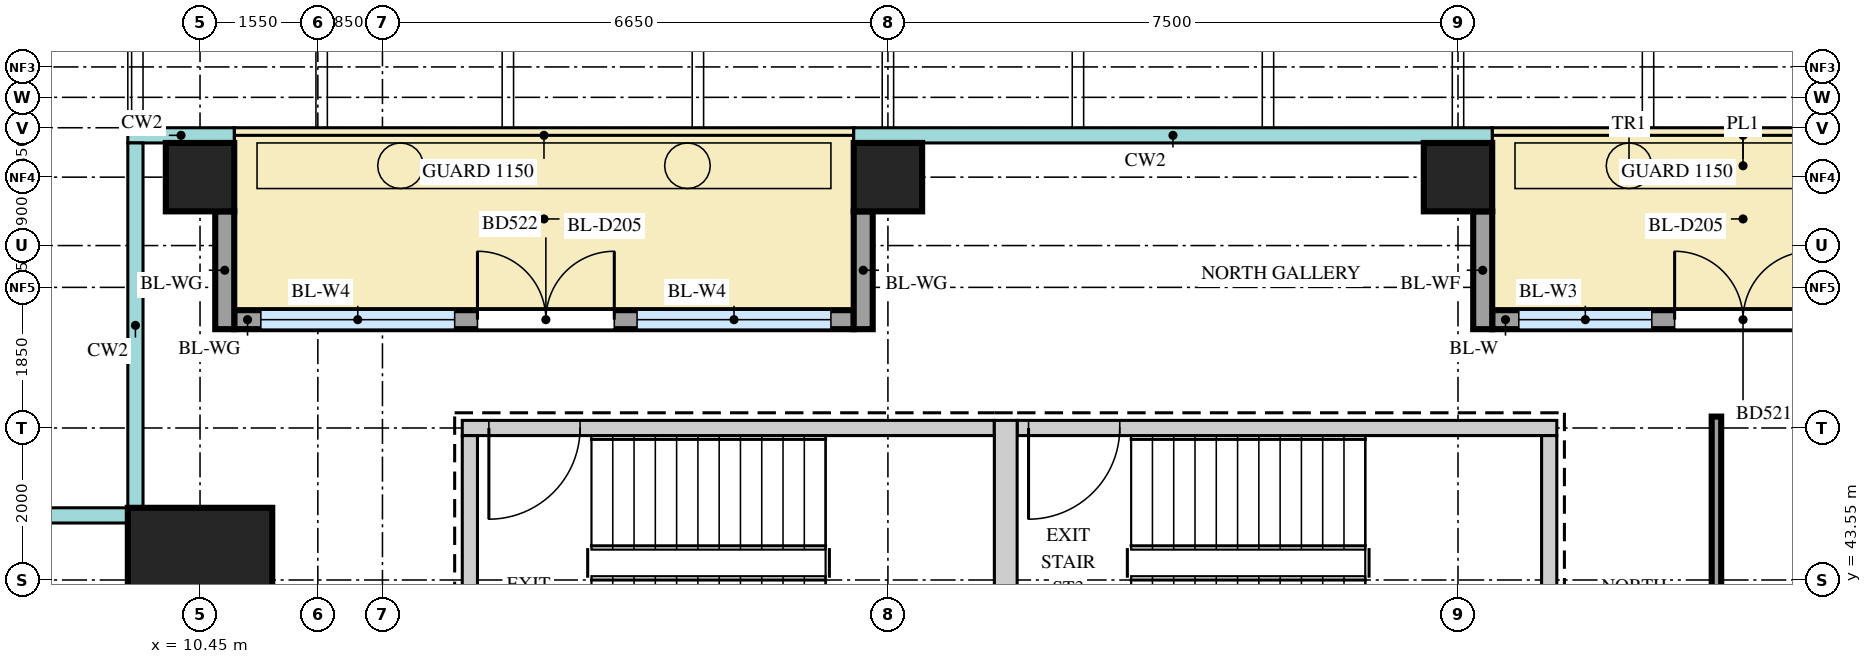
"""IFC4 building model, lengths in metres.
Left out: names, types, materials, properties, quantities, classifications, styles, units other than length and angle.
Written with IfcOpenShell. Run it as: python <this file> out.ifc"""

import sys

from ifc_helpers import new_model, si_unit, direction, frame, frame_2d, origin, origin_2d, place, context, subcontext, project, spatial, rectangle, extrude, source, transform, mapped, element, fill, save


model = new_model("IFC4")
c1 = context("Model", 3, precision=1e-05, world=origin(), true_north=direction((0.0, 1.0)))
c2 = subcontext(c1, "Body", "Model", "MODEL_VIEW")
j1 = project(units=[si_unit("LENGTHUNIT", "METRE"), si_unit("PLANEANGLEUNIT", "RADIAN")], contexts=[c1])
p1 = place(None, origin())
s1 = spatial("IfcSite", under=j1, at=p1, CompositionType="ELEMENT")
p2 = place(p1, origin())
s2 = spatial("IfcBuilding", under=s1, at=p2, CompositionType="ELEMENT")
p3 = place(p2, frame((0.0, 0.0, 234.2)))
s3 = spatial("IfcBuildingStorey", under=s2, at=p3, CompositionType="ELEMENT", Elevation=234.2)
m1 = source(origin(), c2, "Body", "SweptSolid", [
    extrude(rectangle(XDim=7.0, YDim=0.2, at=frame_2d((3.5, 0.0))), origin(), (0.0, 0.0, 1.0), 3.75),
])
p4 = place(p3, frame((13.9, 45.55, 0.0), z_axis=(0.0, 0.0, 1.0), x_axis=(1.0, 0.0, 0.0)))
e1 = element("IfcWall", 1, at=p4, inside=s3, PredefinedType="SHEAR", context=c2, shape_type="MappedRepresentation", body=[
    mapped(m1, transform((0.0, 0.0, 0.0))),
])
m2 = source(origin(), c2, "Body", "SweptSolid", [
    extrude(rectangle(XDim=1.2, YDim=2.1, at=frame_2d((0.6, 1.05))), frame((0.0, 0.11, 0.0), z_axis=(0.0, -1.0, 0.0), x_axis=(1.0, 0.0, 0.0)), (0.0, 0.0, 1.0), 0.22),
])
p5 = place(p4, frame((0.35, 0.0, 0.0)))
e2 = element("IfcOpeningElement", 2, at=p5, cuts=e1, PredefinedType="OPENING", context=c2, shape_type="MappedRepresentation", body=[
    mapped(m2, transform((0.0, 0.0, 0.0))),
])
m3 = source(origin(), c2, "Body", "SweptSolid", [
    extrude(rectangle(XDim=7.1, YDim=0.2, at=frame_2d((3.55, 0.0))), origin(), (0.0, 0.0, 1.0), 3.75),
])
p6 = place(p3, frame((21.2, 45.55, 0.0), z_axis=(0.0, 0.0, 1.0), x_axis=(1.0, 0.0, 0.0)))
e3 = element("IfcWall", 3, at=p6, inside=s3, PredefinedType="SHEAR", context=c2, shape_type="MappedRepresentation", body=[
    mapped(m3, transform((0.0, 0.0, 0.0))),
])
p7 = place(p6, frame((0.15, 0.0, 0.0)))
e4 = element("IfcOpeningElement", 4, at=p7, cuts=e3, PredefinedType="OPENING", context=c2, shape_type="MappedRepresentation", body=[
    mapped(m2, transform((0.0, 0.0, 0.0))),
])
m4 = source(origin(), c2, "Body", "SweptSolid", [
    extrude(rectangle(XDim=3.75, YDim=0.3, at=frame_2d((1.875, 0.0))), origin(), (0.0, 0.0, 1.0), 3.75),
])
p8 = place(p3, frame((21.05, 41.9, 0.0), z_axis=(0.0, 0.0, 1.0), x_axis=(0.0, 1.0, 0.0)))
e5 = element("IfcWall", 5, at=p8, inside=s3, PredefinedType="SHEAR", context=c2, shape_type="MappedRepresentation", body=[
    mapped(m4, transform((0.0, 0.0, 0.0))),
])
m5 = source(origin(), c2, "Body", "SweptSolid", [
    extrude(rectangle(XDim=3.35, YDim=0.2, at=frame_2d((1.675, 0.0))), origin(), (0.0, 0.0, 1.0), 3.75),
])
for number, where, z_axis, x_axis in (
    (6, (14.0, 42.1, 0.0), (0.0, 0.0, 1.0), (0.0, 1.0, 0.0)),
    (7, (28.2, 42.1, 0.0), (0.0, 0.0, 1.0), (0.0, 1.0, 0.0)),
):
    element("IfcWall", number, at=place(p3, frame(where, z_axis=z_axis, x_axis=x_axis)), inside=s3, PredefinedType="SHEAR", context=c2, shape_type="MappedRepresentation", body=[
        mapped(m5, transform((0.0, 0.0, 0.0))),
    ])
m6 = source(origin(), c2, "Body", "SweptSolid", [
    extrude(rectangle(XDim=1.9, YDim=1.9, at=origin_2d()), origin(), (0.0, 0.0, 1.0), 4.0),
])
p9 = place(p3, frame((10.45, 43.55, 0.0), z_axis=(0.0, 0.0, 1.0), x_axis=(1.0, 0.0, 0.0)))
e8 = element("IfcColumn", 8, at=p9, inside=s3, PredefinedType="COLUMN", context=c2, shape_type="MappedRepresentation", body=[
    mapped(m6, transform((0.0, 0.0, 0.0))),
])
m7 = source(origin(), c2, "Body", "SweptSolid", [
    extrude(rectangle(XDim=0.9, YDim=0.9, at=origin_2d()), origin(), (0.0, 0.0, 1.0), 3.75),
])
for number, where, z_axis, x_axis in (
    (9, (10.45, 48.85, 0.0), (0.0, 0.0, 1.0), (1.0, 0.0, 0.0)),
    (10, (19.5, 48.85, 0.0), (0.0, 0.0, 1.0), (1.0, 0.0, 0.0)),
    (11, (27.0, 48.85, 0.0), (0.0, 0.0, 1.0), (1.0, 0.0, 0.0)),
):
    element("IfcColumn", number, at=place(p3, frame(where, z_axis=z_axis, x_axis=x_axis)), inside=s3, PredefinedType="COLUMN", context=c2, shape_type="MappedRepresentation", body=[
        mapped(m7, transform((0.0, 0.0, 0.0))),
    ])
m8 = source(origin(), c2, "Body", "SweptSolid", [
    extrude(rectangle(XDim=6.6, YDim=0.25, at=frame_2d((3.3, 0.0))), origin(), (0.0, 0.0, 1.0), 3.75),
])
p10 = place(p3, frame((27.45, 46.975, 0.0), z_axis=(0.0, 0.0, 1.0), x_axis=(1.0, 0.0, 0.0)))
e12 = element("IfcWall", 12, at=p10, inside=s3, PredefinedType="SOLIDWALL", context=c2, shape_type="MappedRepresentation", body=[
    mapped(m8, transform((0.0, 0.0, 0.0))),
])
m9 = source(origin(), c2, "Body", "SweptSolid", [
    extrude(rectangle(XDim=1.75, YDim=2.4, at=frame_2d((0.875, 1.2))), frame((0.0, 0.135, 0.0), z_axis=(0.0, -1.0, 0.0), x_axis=(1.0, 0.0, 0.0)), (0.0, 0.0, 1.0), 0.27),
])
p11 = place(p10, frame((0.35, 0.0, 0.0)))
e13 = element("IfcOpeningElement", 13, at=p11, cuts=e12, PredefinedType="OPENING", context=c2, shape_type="MappedRepresentation", body=[
    mapped(m9, transform((0.0, 0.0, 0.0))),
])
p12 = place(p10, frame((4.5, 0.0, 0.0)))
e14 = element("IfcOpeningElement", 14, at=p12, cuts=e12, PredefinedType="OPENING", context=c2, shape_type="MappedRepresentation", body=[
    mapped(m9, transform((0.0, 0.0, 0.0))),
])
m10 = source(origin(), c2, "Body", "SweptSolid", [
    extrude(rectangle(XDim=1.8, YDim=2.4, at=frame_2d((0.9, 1.2))), frame((0.0, 0.135, 0.0), z_axis=(0.0, -1.0, 0.0), x_axis=(1.0, 0.0, 0.0)), (0.0, 0.0, 1.0), 0.27),
])
p13 = place(p10, frame((2.4, 0.0, 0.0)))
e15 = element("IfcOpeningElement", 15, at=p13, cuts=e12, PredefinedType="OPENING", context=c2, shape_type="MappedRepresentation", body=[
    mapped(m10, transform((0.0, 0.0, 0.0))),
])
m11 = source(origin(), c2, "Body", "SweptSolid", [
    extrude(rectangle(XDim=1.55, YDim=0.25, at=frame_2d((0.775, 0.0))), origin(), (0.0, 0.0, 1.0), 3.45),
])
p14 = place(p3, frame((27.325, 48.4, 0.0), z_axis=(0.0, 0.0, 1.0), x_axis=(0.0, -1.0, 0.0)))
e16 = element("IfcWall", 16, at=p14, inside=s3, PredefinedType="SOLIDWALL", context=c2, shape_type="MappedRepresentation", body=[
    mapped(m11, transform((0.0, 0.0, 0.0))),
])
m12 = source(origin(), c2, "Body", "SweptSolid", [
    extrude(rectangle(XDim=8.15, YDim=0.25, at=frame_2d((4.075, 0.0))), origin(), (0.0, 0.0, 1.0), 3.35),
])
p15 = place(p3, frame((10.9, 46.975, 0.0), z_axis=(0.0, 0.0, 1.0), x_axis=(1.0, 0.0, 0.0)))
e17 = element("IfcWall", 17, at=p15, inside=s3, PredefinedType="SOLIDWALL", context=c2, shape_type="MappedRepresentation", body=[
    mapped(m12, transform((0.0, 0.0, 0.0))),
])
m13 = source(origin(), c2, "Body", "SweptSolid", [
    extrude(rectangle(XDim=2.55, YDim=2.4, at=frame_2d((1.275, 1.2))), frame((0.0, 0.135, 0.0), z_axis=(0.0, -1.0, 0.0), x_axis=(1.0, 0.0, 0.0)), (0.0, 0.0, 1.0), 0.27),
])
p16 = place(p15, frame((0.35, 0.0, 0.0)))
e18 = element("IfcOpeningElement", 18, at=p16, cuts=e17, PredefinedType="OPENING", context=c2, shape_type="MappedRepresentation", body=[
    mapped(m13, transform((0.0, 0.0, 0.0))),
])
p17 = place(p15, frame((5.3, 0.0, 0.0)))
e19 = element("IfcOpeningElement", 19, at=p17, cuts=e17, PredefinedType="OPENING", context=c2, shape_type="MappedRepresentation", body=[
    mapped(m13, transform((0.0, 0.0, 0.0))),
])
p18 = place(p15, frame((3.2, 0.0, 0.0)))
e20 = element("IfcOpeningElement", 20, at=p18, cuts=e17, PredefinedType="OPENING", context=c2, shape_type="MappedRepresentation", body=[
    mapped(m10, transform((0.0, 0.0, 0.0))),
])
m14 = source(origin(), c2, "Body", "SweptSolid", [
    extrude(rectangle(XDim=1.55, YDim=0.25, at=frame_2d((0.775, 0.0))), origin(), (0.0, 0.0, 1.0), 3.35),
])
for number, where, z_axis, x_axis in (
    (21, (10.775, 48.4, 0.0), (0.0, 0.0, 1.0), (0.0, -1.0, 0.0)),
    (22, (19.175, 48.4, 0.0), (0.0, 0.0, 1.0), (0.0, -1.0, 0.0)),
):
    element("IfcWall", number, at=place(p3, frame(where, z_axis=z_axis, x_axis=x_axis)), inside=s3, PredefinedType="SOLIDWALL", context=c2, shape_type="MappedRepresentation", body=[
        mapped(m14, transform((0.0, 0.0, 0.0))),
    ])
m15 = source(origin(), c2, "Body", "SweptSolid", [
    extrude(rectangle(XDim=6.6, YDim=0.125, at=frame_2d((3.3, 0.0))), origin(), (0.0, 0.0, 1.0), 3.8),
])
p19 = place(p3, frame((30.4, 39.1, 0.0), z_axis=(0.0, 0.0, 1.0), x_axis=(0.0, 1.0, 0.0)))
e23 = element("IfcWall", 23, at=p19, inside=s3, PredefinedType="PARTITIONING", context=c2, shape_type="MappedRepresentation", body=[
    mapped(m15, transform((0.0, 0.0, 0.0))),
])
m16 = source(origin(), c2, "Body", "SweptSolid", [
    extrude(rectangle(XDim=1.75, YDim=2.4, at=frame_2d((0.875, 1.2))), frame((0.0, 0.03, 0.0), z_axis=(0.0, -1.0, 0.0), x_axis=(1.0, 0.0, 0.0)), (0.0, 0.0, 1.0), 0.06),
])
p20 = place(p11, origin())
e24 = element("IfcWindow", 24, at=p20, inside=s3, PartitioningType="SINGLE_PANEL", PredefinedType="WINDOW", context=c2, shape_type="MappedRepresentation", body=[
    mapped(m16, transform((0.0, 0.0, 0.0))),
])
fill(e13, e24)
m17 = source(origin(), c2, "Body", "SweptSolid", [
    extrude(rectangle(XDim=1.8, YDim=2.4, at=frame_2d((0.9, 1.2))), frame((0.0, 0.025, 0.0), z_axis=(0.0, -1.0, 0.0), x_axis=(1.0, 0.0, 0.0)), (0.0, 0.0, 1.0), 0.05),
])
p21 = place(p13, origin())
e25 = element("IfcDoor", 25, at=p21, inside=s3, OperationType="DOUBLE_DOOR_DOUBLE_SWING", PredefinedType="DOOR", context=c2, shape_type="MappedRepresentation", body=[
    mapped(m17, transform((0.0, 0.0, 0.0))),
])
fill(e15, e25)
m18 = source(origin(), c2, "Body", "SweptSolid", [
    extrude(rectangle(XDim=2.55, YDim=2.4, at=frame_2d((1.275, 1.2))), frame((0.0, 0.03, 0.0), z_axis=(0.0, -1.0, 0.0), x_axis=(1.0, 0.0, 0.0)), (0.0, 0.0, 1.0), 0.06),
])
p22 = place(p16, origin())
e26 = element("IfcWindow", 26, at=p22, inside=s3, PartitioningType="SINGLE_PANEL", PredefinedType="WINDOW", context=c2, shape_type="MappedRepresentation", body=[
    mapped(m18, transform((0.0, 0.0, 0.0))),
])
fill(e18, e26)
p23 = place(p17, origin())
e27 = element("IfcWindow", 27, at=p23, inside=s3, PartitioningType="SINGLE_PANEL", PredefinedType="WINDOW", context=c2, shape_type="MappedRepresentation", body=[
    mapped(m18, transform((0.0, 0.0, 0.0))),
])
fill(e19, e27)
p24 = place(p18, origin())
e28 = element("IfcDoor", 28, at=p24, inside=s3, OperationType="DOUBLE_DOOR_DOUBLE_SWING", PredefinedType="DOOR", context=c2, shape_type="MappedRepresentation", body=[
    mapped(m17, transform((0.0, 0.0, 0.0))),
])
fill(e20, e28)
m19 = source(origin(), c2, "Body", "SweptSolid", [
    extrude(rectangle(XDim=1.2, YDim=2.1, at=frame_2d((0.6, 1.05))), frame((0.0, 0.025, 0.0), z_axis=(0.0, -1.0, 0.0), x_axis=(1.0, 0.0, 0.0)), (0.0, 0.0, 1.0), 0.05),
])
p25 = place(p5, origin())
e29 = element("IfcDoor", 29, at=p25, inside=s3, OperationType="SINGLE_SWING_LEFT", PredefinedType="DOOR", context=c2, shape_type="MappedRepresentation", body=[
    mapped(m19, transform((0.0, 0.0, 0.0))),
])
fill(e2, e29)
p26 = place(p7, origin())
e30 = element("IfcDoor", 30, at=p26, inside=s3, OperationType="SINGLE_SWING_LEFT", PredefinedType="DOOR", context=c2, shape_type="MappedRepresentation", body=[
    mapped(m19, transform((0.0, 0.0, 0.0))),
])
fill(e4, e30)
save(model, sys.argv[1])
